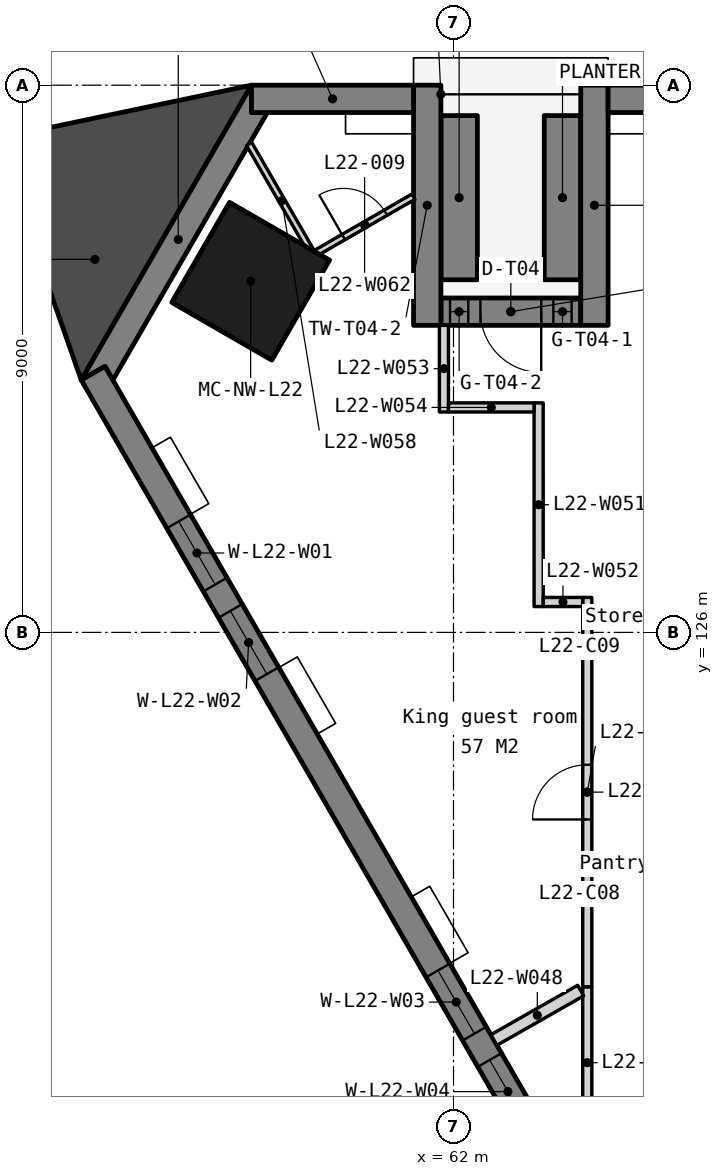
"""IFC4 building model, lengths in metres.
Left out: names, types, materials, properties, quantities, classifications, styles, units other than length and angle.
Written with IfcOpenShell. Run it as: python <this file> out.ifc"""

import sys

from ifc_helpers import new_model, si_unit, direction, frame, frame_2d, origin, origin_2d, place, context, subcontext, project, spatial, polyline, rectangle, outline, extrude, element, fill, save


model = new_model("IFC4")
c1 = context("Model", 3, precision=1e-05, world=origin(), true_north=direction((0.0, 1.0)))
c2 = subcontext(c1, "Body", "Model", "MODEL_VIEW")
j1 = project(units=[si_unit("LENGTHUNIT", "METRE"), si_unit("PLANEANGLEUNIT", "RADIAN")], contexts=[c1])
p1 = place(None, origin())
s1 = spatial("IfcSite", under=j1, at=p1, CompositionType="ELEMENT")
p2 = place(p1, origin())
s2 = spatial("IfcBuilding", under=s1, at=p2, CompositionType="ELEMENT")
p3 = place(p2, frame((0.0, 0.0, 92.3)))
s3 = spatial("IfcBuildingStorey", under=s2, at=p3, CompositionType="ELEMENT", Elevation=92.3)
p4 = place(p3, frame((58.664, 131.775, 0.0), z_axis=(0.0, 0.0, 1.0), x_axis=(-0.5, -0.866025403784, 0.0)))
e1 = element("IfcColumn", 1, at=p4, inside=s3, PredefinedType="COLUMN", context=c2, shape_type="SweptSolid", body=[
    extrude(rectangle(XDim=1.9, YDim=1.9, at=origin_2d()), origin(), (0.0, 0.0, 1.0), 3.5),
])
p5 = place(p3, frame((0.0, 0.0, -0.15)))
e2 = element("IfcWall", 2, at=p5, inside=s3, PredefinedType="SOLIDWALL", context=c2, shape_type="SweptSolid", body=[
    extrude(outline(polyline([(58.678, 135.0), (58.678, 134.55), (58.938, 134.55), (56.398, 130.15), (56.268, 130.375), (55.878, 130.15), (58.678, 135.0)])), origin(), (0.0, 0.0, 1.0), 3.5),
])
p6 = place(p3, frame((101.322, 134.775, -0.15), z_axis=(0.0, 0.0, 1.0), x_axis=(-1.0, 0.0, 0.0)))
e3 = element("IfcWall", 3, at=p6, inside=s3, PredefinedType="SOLIDWALL", context=c2, shape_type="SweptSolid", body=[
    extrude(outline(polyline([(0.0, 0.0), (0.0, 3.5), (36.779, 3.5), (36.779, 0.0), (0.0, 0.0)])), frame((0.0, 0.225, 0.0), z_axis=(0.0, -1.0, 0.0), x_axis=(1.0, 0.0, 0.0)), (0.0, 0.0, 1.0), 0.45),
])
p7 = place(p6, frame((2.814, 0.0, 1.05)))
e4 = element("IfcOpeningElement", 4, at=p7, cuts=e3, PredefinedType="OPENING", context=c2, shape_type="SweptSolid", body=[
    extrude(rectangle(XDim=1.2, YDim=1.5, at=frame_2d((0.6, 0.75))), frame((0.0, 0.235, 0.0), z_axis=(0.0, -1.0, 0.0), x_axis=(1.0, 0.0, 0.0)), (0.0, 0.0, 1.0), 0.47),
])
p8 = place(p6, frame((4.514, 0.0, 1.05)))
e5 = element("IfcOpeningElement", 5, at=p8, cuts=e3, PredefinedType="OPENING", context=c2, shape_type="SweptSolid", body=[
    extrude(rectangle(XDim=1.2, YDim=1.5, at=frame_2d((0.6, 0.75))), frame((0.0, 0.235, 0.0), z_axis=(0.0, -1.0, 0.0), x_axis=(1.0, 0.0, 0.0)), (0.0, 0.0, 1.0), 0.47),
])
p9 = place(p6, frame((11.343, 0.0, 1.05)))
e6 = element("IfcOpeningElement", 6, at=p9, cuts=e3, PredefinedType="OPENING", context=c2, shape_type="SweptSolid", body=[
    extrude(rectangle(XDim=1.2, YDim=1.5, at=frame_2d((0.6, 0.75))), frame((0.0, 0.235, 0.0), z_axis=(0.0, -1.0, 0.0), x_axis=(1.0, 0.0, 0.0)), (0.0, 0.0, 1.0), 0.47),
])
p10 = place(p6, frame((13.043, 0.0, 1.05)))
e7 = element("IfcOpeningElement", 7, at=p10, cuts=e3, PredefinedType="OPENING", context=c2, shape_type="SweptSolid", body=[
    extrude(rectangle(XDim=1.2, YDim=1.5, at=frame_2d((0.6, 0.75))), frame((0.0, 0.235, 0.0), z_axis=(0.0, -1.0, 0.0), x_axis=(1.0, 0.0, 0.0)), (0.0, 0.0, 1.0), 0.47),
])
p11 = place(p6, frame((19.872, 0.0, 1.05)))
e8 = element("IfcOpeningElement", 8, at=p11, cuts=e3, PredefinedType="OPENING", context=c2, shape_type="SweptSolid", body=[
    extrude(rectangle(XDim=1.2, YDim=1.5, at=frame_2d((0.6, 0.75))), frame((0.0, 0.235, 0.0), z_axis=(0.0, -1.0, 0.0), x_axis=(1.0, 0.0, 0.0)), (0.0, 0.0, 1.0), 0.47),
])
p12 = place(p6, frame((21.572, 0.0, 1.05)))
e9 = element("IfcOpeningElement", 9, at=p12, cuts=e3, PredefinedType="OPENING", context=c2, shape_type="SweptSolid", body=[
    extrude(rectangle(XDim=1.2, YDim=1.5, at=frame_2d((0.6, 0.75))), frame((0.0, 0.235, 0.0), z_axis=(0.0, -1.0, 0.0), x_axis=(1.0, 0.0, 0.0)), (0.0, 0.0, 1.0), 0.47),
])
p13 = place(p6, frame((28.4, 0.0, 1.05)))
e10 = element("IfcOpeningElement", 10, at=p13, cuts=e3, PredefinedType="OPENING", context=c2, shape_type="SweptSolid", body=[
    extrude(rectangle(XDim=1.2, YDim=1.5, at=frame_2d((0.6, 0.75))), frame((0.0, 0.235, 0.0), z_axis=(0.0, -1.0, 0.0), x_axis=(1.0, 0.0, 0.0)), (0.0, 0.0, 1.0), 0.47),
])
p14 = place(p6, frame((30.1, 0.0, 1.05)))
e11 = element("IfcOpeningElement", 11, at=p14, cuts=e3, PredefinedType="OPENING", context=c2, shape_type="SweptSolid", body=[
    extrude(rectangle(XDim=1.2, YDim=1.5, at=frame_2d((0.6, 0.75))), frame((0.0, 0.235, 0.0), z_axis=(0.0, -1.0, 0.0), x_axis=(1.0, 0.0, 0.0)), (0.0, 0.0, 1.0), 0.47),
])
p15 = place(p3, frame((61.343, 134.775, -0.15), z_axis=(0.0, 0.0, 1.0), x_axis=(-1.0, 0.0, 0.0)))
e12 = element("IfcWall", 12, at=p15, inside=s3, PredefinedType="SOLIDWALL", context=c2, shape_type="SweptSolid", body=[
    extrude(outline(polyline([(2.664, 3.5), (2.664, 0.0), (0.0, 0.0), (0.0, 3.5), (2.664, 3.5)])), frame((0.0, 0.225, 0.0), z_axis=(0.0, -1.0, 0.0), x_axis=(1.0, 0.0, 0.0)), (0.0, 0.0, 1.0), 0.45),
])
p16 = place(p3, frame((56.073, 130.263, -0.15), z_axis=(0.0, 0.0, 1.0), x_axis=(0.500000478905, -0.866025127289, 0.0)))
e13 = element("IfcWall", 13, at=p16, inside=s3, PredefinedType="SOLIDWALL", context=c2, shape_type="SweptSolid", body=[
    extrude(outline(polyline([(42.643, 0.0), (42.643, 3.5), (0.0, 3.5), (0.0, 0.0), (42.643, 0.0)])), frame((0.0, 0.225, 0.0), z_axis=(0.0, -1.0, 0.0), x_axis=(1.0, 0.0, 0.0)), (0.0, 0.0, 1.0), 0.45),
])
p17 = place(p16, frame((2.814, 0.0, 1.05)))
e14 = element("IfcOpeningElement", 14, at=p17, cuts=e13, PredefinedType="OPENING", context=c2, shape_type="SweptSolid", body=[
    extrude(rectangle(XDim=1.2, YDim=1.5, at=frame_2d((0.6, 0.75))), frame((0.0, 0.235, 0.0), z_axis=(0.0, -1.0, 0.0), x_axis=(1.0, 0.0, 0.0)), (0.0, 0.0, 1.0), 0.47),
])
p18 = place(p16, frame((4.514, 0.0, 1.05)))
e15 = element("IfcOpeningElement", 15, at=p18, cuts=e13, PredefinedType="OPENING", context=c2, shape_type="SweptSolid", body=[
    extrude(rectangle(XDim=1.2, YDim=1.5, at=frame_2d((0.6, 0.75))), frame((0.0, 0.235, 0.0), z_axis=(0.0, -1.0, 0.0), x_axis=(1.0, 0.0, 0.0)), (0.0, 0.0, 1.0), 0.47),
])
p19 = place(p16, frame((11.343, 0.0, 1.05)))
e16 = element("IfcOpeningElement", 16, at=p19, cuts=e13, PredefinedType="OPENING", context=c2, shape_type="SweptSolid", body=[
    extrude(rectangle(XDim=1.2, YDim=1.5, at=frame_2d((0.6, 0.75))), frame((0.0, 0.235, 0.0), z_axis=(0.0, -1.0, 0.0), x_axis=(1.0, 0.0, 0.0)), (0.0, 0.0, 1.0), 0.47),
])
p20 = place(p16, frame((13.043, 0.0, 1.05)))
e17 = element("IfcOpeningElement", 17, at=p20, cuts=e13, PredefinedType="OPENING", context=c2, shape_type="SweptSolid", body=[
    extrude(rectangle(XDim=1.2, YDim=1.5, at=frame_2d((0.6, 0.75))), frame((0.0, 0.235, 0.0), z_axis=(0.0, -1.0, 0.0), x_axis=(1.0, 0.0, 0.0)), (0.0, 0.0, 1.0), 0.47),
])
p21 = place(p16, frame((19.872, 0.0, 1.05)))
e18 = element("IfcOpeningElement", 18, at=p21, cuts=e13, PredefinedType="OPENING", context=c2, shape_type="SweptSolid", body=[
    extrude(rectangle(XDim=1.2, YDim=1.5, at=frame_2d((0.6, 0.75))), frame((0.0, 0.235, 0.0), z_axis=(0.0, -1.0, 0.0), x_axis=(1.0, 0.0, 0.0)), (0.0, 0.0, 1.0), 0.47),
])
p22 = place(p16, frame((21.572, 0.0, 1.05)))
e19 = element("IfcOpeningElement", 19, at=p22, cuts=e13, PredefinedType="OPENING", context=c2, shape_type="SweptSolid", body=[
    extrude(rectangle(XDim=1.2, YDim=1.5, at=frame_2d((0.6, 0.75))), frame((0.0, 0.235, 0.0), z_axis=(0.0, -1.0, 0.0), x_axis=(1.0, 0.0, 0.0)), (0.0, 0.0, 1.0), 0.47),
])
p23 = place(p16, frame((28.4, 0.0, 1.05)))
e20 = element("IfcOpeningElement", 20, at=p23, cuts=e13, PredefinedType="OPENING", context=c2, shape_type="SweptSolid", body=[
    extrude(rectangle(XDim=1.2, YDim=1.5, at=frame_2d((0.6, 0.75))), frame((0.0, 0.235, 0.0), z_axis=(0.0, -1.0, 0.0), x_axis=(1.0, 0.0, 0.0)), (0.0, 0.0, 1.0), 0.47),
])
p24 = place(p16, frame((30.1, 0.0, 1.05)))
e21 = element("IfcOpeningElement", 21, at=p24, cuts=e13, PredefinedType="OPENING", context=c2, shape_type="SweptSolid", body=[
    extrude(rectangle(XDim=1.2, YDim=1.5, at=frame_2d((0.6, 0.75))), frame((0.0, 0.235, 0.0), z_axis=(0.0, -1.0, 0.0), x_axis=(1.0, 0.0, 0.0)), (0.0, 0.0, 1.0), 0.47),
])
p25 = place(p16, frame((36.929, 0.0, 1.05)))
e22 = element("IfcOpeningElement", 22, at=p25, cuts=e13, PredefinedType="OPENING", context=c2, shape_type="SweptSolid", body=[
    extrude(rectangle(XDim=1.2, YDim=1.5, at=frame_2d((0.6, 0.75))), frame((0.0, 0.235, 0.0), z_axis=(0.0, -1.0, 0.0), x_axis=(1.0, 0.0, 0.0)), (0.0, 0.0, 1.0), 0.47),
])
p26 = place(p16, frame((38.629, 0.0, 1.05)))
e23 = element("IfcOpeningElement", 23, at=p26, cuts=e13, PredefinedType="OPENING", context=c2, shape_type="SweptSolid", body=[
    extrude(rectangle(XDim=1.2, YDim=1.5, at=frame_2d((0.6, 0.75))), frame((0.0, 0.235, 0.0), z_axis=(0.0, -1.0, 0.0), x_axis=(1.0, 0.0, 0.0)), (0.0, 0.0, 1.0), 0.47),
])
for number, where, z_axis, x_axis in (
    (24, (64.318, 135.0, 0.0), (0.0, 0.0, 1.0), (0.0, -1.0, 0.0)),
    (25, (61.568, 135.0, 0.0), (0.0, 0.0, 1.0), (0.0, -1.0, 0.0)),
):
    element("IfcWall", number, at=place(p3, frame(where, z_axis=z_axis, x_axis=x_axis)), inside=s3, PredefinedType="SOLIDWALL", context=c2, shape_type="SweptSolid", body=[
        extrude(rectangle(XDim=3.95, YDim=0.45, at=frame_2d((1.975, 0.0))), origin(), (0.0, 0.0, 1.0), 6.85),
    ])
p27 = place(p3, frame((64.093, 131.275, -0.15), z_axis=(0.0, 0.0, 1.0), x_axis=(-1.0, 0.0, 0.0)))
e26 = element("IfcWall", 26, at=p27, inside=s3, PredefinedType="SOLIDWALL", context=c2, shape_type="SweptSolid", body=[
    extrude(rectangle(XDim=2.3, YDim=0.45, at=frame_2d((1.15, 0.0))), origin(), (0.0, 0.0, 1.0), 3.097),
])
p28 = place(p27, frame((0.65, 0.0, 0.15)))
e27 = element("IfcOpeningElement", 27, at=p28, cuts=e26, PredefinedType="OPENING", context=c2, shape_type="SweptSolid", body=[
    extrude(rectangle(XDim=1.0, YDim=2.4, at=frame_2d((0.5, 1.2))), frame((0.0, 0.235, 0.0), z_axis=(0.0, -1.0, 0.0), x_axis=(1.0, 0.0, 0.0)), (0.0, 0.0, 1.0), 0.47),
])
p29 = place(p27, frame((0.15, 0.0, 0.15)))
e28 = element("IfcOpeningElement", 28, at=p29, cuts=e26, PredefinedType="OPENING", context=c2, shape_type="SweptSolid", body=[
    extrude(rectangle(XDim=0.3, YDim=2.4, at=frame_2d((0.15, 1.2))), frame((0.0, 0.235, 0.0), z_axis=(0.0, -1.0, 0.0), x_axis=(1.0, 0.0, 0.0)), (0.0, 0.0, 1.0), 0.47),
])
p30 = place(p27, frame((1.85, 0.0, 0.15)))
e29 = element("IfcOpeningElement", 29, at=p30, cuts=e26, PredefinedType="OPENING", context=c2, shape_type="SweptSolid", body=[
    extrude(rectangle(XDim=0.3, YDim=2.4, at=frame_2d((0.15, 1.2))), frame((0.0, 0.235, 0.0), z_axis=(0.0, -1.0, 0.0), x_axis=(1.0, 0.0, 0.0)), (0.0, 0.0, 1.0), 0.47),
])
for number, where, z_axis, x_axis in (
    (30, (63.793, 134.5, 0.0), (0.0, 0.0, 1.0), (0.0, -1.0, 0.0)),
    (31, (62.093, 134.5, 0.0), (0.0, 0.0, 1.0), (0.0, -1.0, 0.0)),
):
    element("IfcWall", number, at=place(p3, frame(where, z_axis=z_axis, x_axis=x_axis)), inside=s3, PredefinedType="STANDARD", context=c2, shape_type="SweptSolid", body=[
        extrude(rectangle(XDim=2.7, YDim=0.6, at=frame_2d((1.35, 0.0))), origin(), (0.0, 0.0, 1.0), 0.6),
    ])
p31 = place(p3, frame((0.0, 0.0, -0.15)))
e32 = element("IfcWall", 32, at=p31, inside=s3, PredefinedType="SOLIDWALL", context=c2, shape_type="SweptSolid", body=[
    extrude(outline(polyline([(58.678, 135.0), (54.484, 134.12), (55.878, 130.15), (58.678, 135.0)])), origin(), (0.0, 0.0, 1.0), 3.5),
])
p32 = place(p3, frame((64.2, 117.675, 0.0), z_axis=(0.0, 0.0, 1.0), x_axis=(0.0, 1.0, 0.0)))
e33 = element("IfcWall", 33, at=p32, inside=s3, PredefinedType="PARTITIONING", context=c2, shape_type="SweptSolid", body=[
    extrude(rectangle(XDim=2.496, YDim=0.15, at=frame_2d((1.248, 0.0))), origin(), (0.0, 0.0, 1.0), 3.35),
])
p33 = place(p3, frame((62.665, 119.296, 0.0), z_axis=(0.0, 0.0, 1.0), x_axis=(0.868846341096, 0.495081847339, 0.0)))
e34 = element("IfcWall", 34, at=p33, inside=s3, PredefinedType="PARTITIONING", context=c2, shape_type="SweptSolid", body=[
    extrude(rectangle(XDim=1.642, YDim=0.2, at=frame_2d((0.821, 0.0))), origin(), (0.0, 0.0, 1.0), 3.35),
])
p34 = place(p3, frame((64.2, 120.171, 0.0), z_axis=(0.0, 0.0, 1.0), x_axis=(0.0, 1.0, 0.0)))
e35 = element("IfcWall", 35, at=p34, inside=s3, PredefinedType="PARTITIONING", context=c2, shape_type="SweptSolid", body=[
    extrude(rectangle(XDim=6.404, YDim=0.15, at=frame_2d((3.202, 0.0))), origin(), (0.0, 0.0, 1.0), 3.35),
])
p35 = place(p34, frame((2.752, 0.0, 0.0)))
e36 = element("IfcOpeningElement", 36, at=p35, cuts=e35, PredefinedType="OPENING", context=c2, shape_type="SweptSolid", body=[
    extrude(rectangle(XDim=0.9, YDim=2.1, at=frame_2d((0.45, 1.05))), frame((0.0, 0.085, 0.0), z_axis=(0.0, -1.0, 0.0), x_axis=(1.0, 0.0, 0.0)), (0.0, 0.0, 1.0), 0.17),
])
p36 = place(p3, frame((63.4, 129.775, 0.0), z_axis=(0.0, 0.0, 1.0), x_axis=(7.2880985e-05, -0.999999997344, 0.0)))
e37 = element("IfcWall", 37, at=p36, inside=s3, PredefinedType="PARTITIONING", context=c2, shape_type="SweptSolid", body=[
    extrude(rectangle(XDim=3.35, YDim=0.15, at=frame_2d((1.675, 0.0))), origin(), (0.0, 0.0, 1.0), 3.35),
])
p37 = place(p3, frame((63.476, 126.5, 0.0), z_axis=(0.0, 0.0, 1.0), x_axis=(1.0, 0.0, 0.0)))
e38 = element("IfcWall", 38, at=p37, inside=s3, PredefinedType="PARTITIONING", context=c2, shape_type="SweptSolid", body=[
    extrude(rectangle(XDim=0.649, YDim=0.15, at=frame_2d((0.325, 0.0))), origin(), (0.0, 0.0, 1.0), 3.35),
])
p38 = place(p3, frame((61.843, 129.625, 0.0), z_axis=(0.0, 0.0, 1.0), x_axis=(0.0, 1.0, 0.0)))
e39 = element("IfcWall", 39, at=p38, inside=s3, PredefinedType="PARTITIONING", context=c2, shape_type="SweptSolid", body=[
    extrude(rectangle(XDim=1.425, YDim=0.15, at=frame_2d((0.712, 0.0))), origin(), (0.0, 0.0, 1.0), 3.35),
])
p39 = place(p3, frame((61.918, 129.7, 0.0), z_axis=(0.0, 0.0, 1.0), x_axis=(1.0, 0.0, 0.0)))
e40 = element("IfcWall", 40, at=p39, inside=s3, PredefinedType="PARTITIONING", context=c2, shape_type="SweptSolid", body=[
    extrude(rectangle(XDim=1.407, YDim=0.15, at=frame_2d((0.704, 0.0))), origin(), (0.0, 0.0, 1.0), 3.35),
])
p40 = place(p3, frame((58.639, 134.032, 0.0), z_axis=(0.0, 0.0, 1.0), x_axis=(0.500020435542, -0.866013604997, 0.0)))
e41 = element("IfcWall", 41, at=p40, inside=s3, PredefinedType="PARTITIONING", context=c2, shape_type="SweptSolid", body=[
    extrude(rectangle(XDim=2.151, YDim=0.1, at=frame_2d((1.076, 0.0))), origin(), (0.0, 0.0, 1.0), 3.35),
])
p41 = place(p3, frame((59.733, 132.238, 0.0), z_axis=(0.0, 0.0, 1.0), x_axis=(0.866019315389, 0.500010545262, 0.0)))
e42 = element("IfcWall", 42, at=p41, inside=s3, PredefinedType="PARTITIONING", context=c2, shape_type="SweptSolid", body=[
    extrude(rectangle(XDim=1.858, YDim=0.1, at=frame_2d((0.929, 0.0))), origin(), (0.0, 0.0, 1.0), 3.35),
])
p42 = place(p41, frame((0.529, 0.0, 0.0)))
e43 = element("IfcOpeningElement", 43, at=p42, cuts=e42, PredefinedType="OPENING", context=c2, shape_type="SweptSolid", body=[
    extrude(rectangle(XDim=0.8, YDim=2.1, at=frame_2d((0.4, 1.05))), frame((0.0, 0.06, 0.0), z_axis=(0.0, -1.0, 0.0), x_axis=(1.0, 0.0, 0.0)), (0.0, 0.0, 1.0), 0.12),
])
p43 = place(p17, origin())
e44 = element("IfcWindow", 44, at=p43, inside=s3, PartitioningType="SINGLE_PANEL", PredefinedType="WINDOW", context=c2, shape_type="SweptSolid", body=[
    extrude(rectangle(XDim=1.2, YDim=1.5, at=frame_2d((0.6, 0.75))), frame((0.0, 0.03, 0.0), z_axis=(0.0, -1.0, 0.0), x_axis=(1.0, 0.0, 0.0)), (0.0, 0.0, 1.0), 0.06),
])
fill(e14, e44)
p44 = place(p18, origin())
e45 = element("IfcWindow", 45, at=p44, inside=s3, PartitioningType="SINGLE_PANEL", PredefinedType="WINDOW", context=c2, shape_type="SweptSolid", body=[
    extrude(rectangle(XDim=1.2, YDim=1.5, at=frame_2d((0.6, 0.75))), frame((0.0, 0.03, 0.0), z_axis=(0.0, -1.0, 0.0), x_axis=(1.0, 0.0, 0.0)), (0.0, 0.0, 1.0), 0.06),
])
fill(e15, e45)
p45 = place(p19, origin())
e46 = element("IfcWindow", 46, at=p45, inside=s3, PartitioningType="SINGLE_PANEL", PredefinedType="WINDOW", context=c2, shape_type="SweptSolid", body=[
    extrude(rectangle(XDim=1.2, YDim=1.5, at=frame_2d((0.6, 0.75))), frame((0.0, 0.03, 0.0), z_axis=(0.0, -1.0, 0.0), x_axis=(1.0, 0.0, 0.0)), (0.0, 0.0, 1.0), 0.06),
])
fill(e16, e46)
p46 = place(p20, origin())
e47 = element("IfcWindow", 47, at=p46, inside=s3, PartitioningType="SINGLE_PANEL", PredefinedType="WINDOW", context=c2, shape_type="SweptSolid", body=[
    extrude(rectangle(XDim=1.2, YDim=1.5, at=frame_2d((0.6, 0.75))), frame((0.0, 0.03, 0.0), z_axis=(0.0, -1.0, 0.0), x_axis=(1.0, 0.0, 0.0)), (0.0, 0.0, 1.0), 0.06),
])
fill(e17, e47)
p47 = place(p28, origin())
e48 = element("IfcDoor", 48, at=p47, inside=s3, OperationType="SINGLE_SWING_LEFT", PredefinedType="DOOR", context=c2, shape_type="SweptSolid", body=[
    extrude(rectangle(XDim=1.0, YDim=2.4, at=frame_2d((0.5, 1.2))), frame((0.0, 0.025, 0.0), z_axis=(0.0, -1.0, 0.0), x_axis=(1.0, 0.0, 0.0)), (0.0, 0.0, 1.0), 0.05),
])
fill(e27, e48)
p48 = place(p29, origin())
e49 = element("IfcWindow", 49, at=p48, inside=s3, PartitioningType="SINGLE_PANEL", PredefinedType="WINDOW", context=c2, shape_type="SweptSolid", body=[
    extrude(rectangle(XDim=0.3, YDim=2.4, at=frame_2d((0.15, 1.2))), frame((0.0, 0.03, 0.0), z_axis=(0.0, -1.0, 0.0), x_axis=(1.0, 0.0, 0.0)), (0.0, 0.0, 1.0), 0.06),
])
fill(e28, e49)
p49 = place(p30, origin())
e50 = element("IfcWindow", 50, at=p49, inside=s3, PartitioningType="SINGLE_PANEL", PredefinedType="WINDOW", context=c2, shape_type="SweptSolid", body=[
    extrude(rectangle(XDim=0.3, YDim=2.4, at=frame_2d((0.15, 1.2))), frame((0.0, 0.03, 0.0), z_axis=(0.0, -1.0, 0.0), x_axis=(1.0, 0.0, 0.0)), (0.0, 0.0, 1.0), 0.06),
])
fill(e29, e50)
p50 = place(p35, origin())
e51 = element("IfcDoor", 51, at=p50, inside=s3, OperationType="SINGLE_SWING_LEFT", PredefinedType="DOOR", context=c2, shape_type="SweptSolid", body=[
    extrude(rectangle(XDim=0.9, YDim=2.1, at=frame_2d((0.45, 1.05))), frame((0.0, 0.025, 0.0), z_axis=(0.0, -1.0, 0.0), x_axis=(1.0, 0.0, 0.0)), (0.0, 0.0, 1.0), 0.05),
])
fill(e36, e51)
p51 = place(p42, origin())
e52 = element("IfcDoor", 52, at=p51, inside=s3, OperationType="SINGLE_SWING_LEFT", PredefinedType="DOOR", context=c2, shape_type="SweptSolid", body=[
    extrude(rectangle(XDim=0.8, YDim=2.1, at=frame_2d((0.4, 1.05))), frame((0.0, 0.025, 0.0), z_axis=(0.0, -1.0, 0.0), x_axis=(1.0, 0.0, 0.0)), (0.0, 0.0, 1.0), 0.05),
])
fill(e43, e52)
save(model, sys.argv[1])
